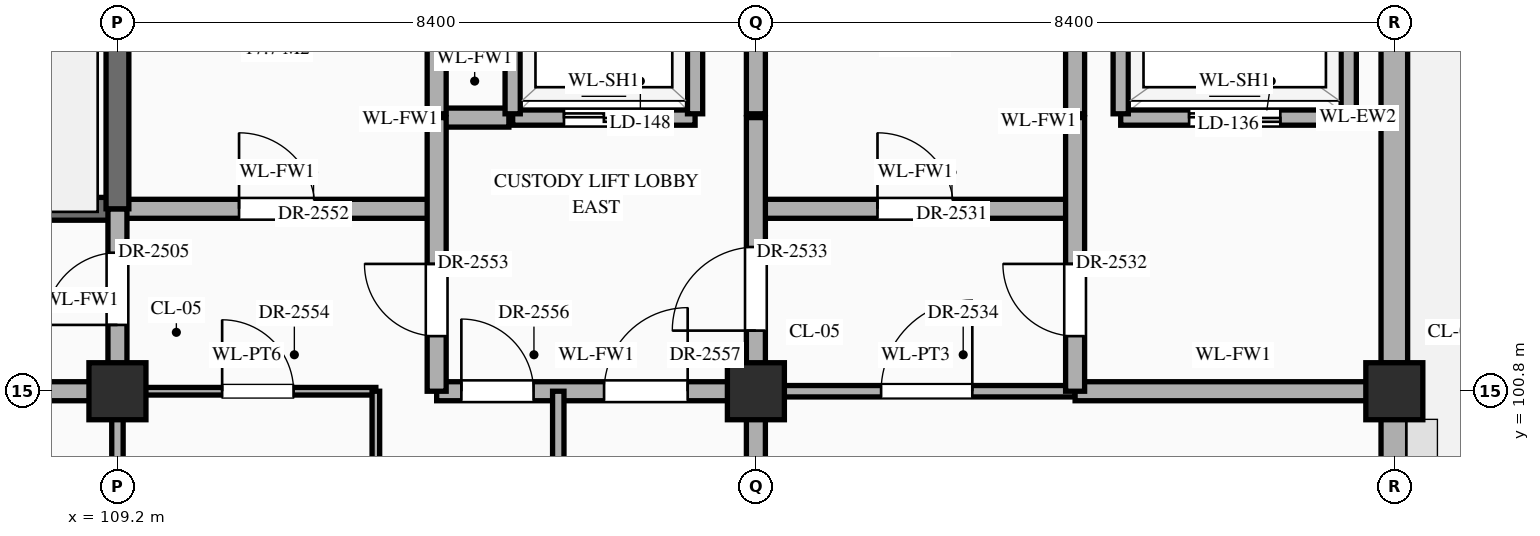
"""IFC4 building model, lengths in metres.
Left out: names, types, materials, properties, quantities, classifications, styles, units other than length and angle.
Written with IfcOpenShell. Run it as: python <this file> out.ifc"""

import sys

from ifc_helpers import new_model, si_unit, direction, frame, frame_2d, origin, origin_2d, place, context, subcontext, project, spatial, rectangle, extrude, element, fill, save


model = new_model("IFC4")
c1 = context("Model", 3, precision=1e-05, world=origin(), true_north=direction((0.0, 1.0)))
c2 = subcontext(c1, "Body", "Model", "MODEL_VIEW")
j1 = project(units=[si_unit("LENGTHUNIT", "METRE"), si_unit("PLANEANGLEUNIT", "RADIAN")], contexts=[c1])
p1 = place(None, origin())
s1 = spatial("IfcSite", under=j1, at=p1, CompositionType="ELEMENT")
p2 = place(p1, origin())
s2 = spatial("IfcBuilding", under=s1, at=p2, CompositionType="ELEMENT")
p3 = place(p2, frame((0.0, 0.0, 35.1)))
s3 = spatial("IfcBuildingStorey", under=s2, at=p3, CompositionType="ELEMENT", Elevation=35.1)
for number, where, z_axis, x_axis in (
    (1, (109.2, 100.8, 0.0), (0.0, 0.0, 1.0), (1.0, 0.0, 0.0)),
    (2, (117.6, 100.8, 0.0), (0.0, 0.0, 1.0), (1.0, 0.0, 0.0)),
    (3, (126.0, 100.8, 0.0), (0.0, 0.0, 1.0), (1.0, 0.0, 0.0)),
):
    element("IfcColumn", number, at=place(p3, frame(where, z_axis=z_axis, x_axis=x_axis)), inside=s3, PredefinedType="COLUMN", context=c2, shape_type="SweptSolid", body=[
        extrude(rectangle(XDim=0.75, YDim=0.75, at=origin_2d()), origin(), (0.0, 0.0, 1.0), 4.2),
    ])
p4 = place(p3, frame((126.0, 93.97, 0.0), z_axis=(0.0, 0.0, 1.0), x_axis=(0.0, 1.0, 0.0)))
e4 = element("IfcWall", 4, at=p4, inside=s3, PredefinedType="STANDARD", context=c2, shape_type="SweptSolid", body=[
    extrude(rectangle(XDim=6.46, YDim=0.35, at=frame_2d((3.23, 0.0))), origin(), (0.0, 0.0, 1.0), 3.3),
])
p5 = place(p4, frame((4.005, 0.0, 0.85)))
e5 = element("IfcOpeningElement", 5, at=p5, cuts=e4, PredefinedType="OPENING", context=c2, shape_type="SweptSolid", body=[
    extrude(rectangle(XDim=1.05, YDim=1.56, at=frame_2d((0.525, 0.78))), frame((0.0, 0.187, 0.0), z_axis=(0.0, -1.0, 0.0), x_axis=(1.0, 0.0, 0.0)), (0.0, 0.0, 1.0), 0.374),
])
p6 = place(p3, frame((126.0, 101.17, 0.0), z_axis=(0.0, 0.0, 1.0), x_axis=(0.0, 1.0, 0.0)))
e6 = element("IfcWall", 6, at=p6, inside=s3, PredefinedType="STANDARD", context=c2, shape_type="SweptSolid", body=[
    extrude(rectangle(XDim=6.46, YDim=0.35, at=frame_2d((3.23, 0.0))), origin(), (0.0, 0.0, 1.0), 3.3),
])
p7 = place(p3, frame((96.6, 100.8, 0.0), z_axis=(0.0, 0.0, 1.0), x_axis=(1.0, 0.0, 0.0)))
e7 = element("IfcWall", 7, at=p7, inside=s3, PredefinedType="STANDARD", context=c2, shape_type="SweptSolid", body=[
    extrude(rectangle(XDim=12.6, YDim=0.25, at=frame_2d((6.3, 0.0))), origin(), (0.0, 0.0, 1.0), 3.1),
])
p8 = place(p7, frame((7.85, 0.0, 0.0)))
e8 = element("IfcOpeningElement", 8, at=p8, cuts=e7, PredefinedType="OPENING", context=c2, shape_type="SweptSolid", body=[
    extrude(rectangle(XDim=1.1, YDim=2.2, at=frame_2d((0.55, 1.1))), frame((0.0, 0.137, 0.0), z_axis=(0.0, -1.0, 0.0), x_axis=(1.0, 0.0, 0.0)), (0.0, 0.0, 1.0), 0.274),
])
p9 = place(p3, frame((109.2, 100.8, 0.0), z_axis=(0.0, 0.0, 1.0), x_axis=(1.0, 0.0, 0.0)))
e9 = element("IfcWall", 9, at=p9, inside=s3, PredefinedType="STANDARD", context=c2, shape_type="SweptSolid", body=[
    extrude(rectangle(XDim=3.4, YDim=0.1, at=frame_2d((1.7, 0.0))), origin(), (0.0, 0.0, 1.0), 3.1),
])
p10 = place(p9, frame((1.377, 0.0, 0.0)))
e10 = element("IfcOpeningElement", 10, at=p10, cuts=e9, PredefinedType="OPENING", context=c2, shape_type="SweptSolid", body=[
    extrude(rectangle(XDim=0.94, YDim=2.3, at=frame_2d((0.47, 1.15))), frame((0.0, 0.062, 0.0), z_axis=(0.0, -1.0, 0.0), x_axis=(1.0, 0.0, 0.0)), (0.0, 0.0, 1.0), 0.124),
])
p11 = place(p3, frame((113.4, 100.8, 0.0), z_axis=(0.0, 0.0, 1.0), x_axis=(1.0, 0.0, 0.0)))
e11 = element("IfcWall", 11, at=p11, inside=s3, PredefinedType="STANDARD", context=c2, shape_type="SweptSolid", body=[
    extrude(rectangle(XDim=4.2, YDim=0.25, at=frame_2d((2.1, 0.0))), origin(), (0.0, 0.0, 1.0), 3.1),
])
p12 = place(p11, frame((0.325, 0.0, 0.0)))
e12 = element("IfcOpeningElement", 12, at=p12, cuts=e11, PredefinedType="OPENING", context=c2, shape_type="SweptSolid", body=[
    extrude(rectangle(XDim=0.95, YDim=2.15, at=frame_2d((0.475, 1.075))), frame((0.0, 0.137, 0.0), z_axis=(0.0, -1.0, 0.0), x_axis=(1.0, 0.0, 0.0)), (0.0, 0.0, 1.0), 0.274),
])
p13 = place(p11, frame((2.202, 0.0, 0.0)))
e13 = element("IfcOpeningElement", 13, at=p13, cuts=e11, PredefinedType="OPENING", context=c2, shape_type="SweptSolid", body=[
    extrude(rectangle(XDim=1.1, YDim=2.2, at=frame_2d((0.55, 1.1))), frame((0.0, 0.137, 0.0), z_axis=(0.0, -1.0, 0.0), x_axis=(1.0, 0.0, 0.0)), (0.0, 0.0, 1.0), 0.274),
])
p14 = place(p3, frame((117.6, 100.8, 0.0), z_axis=(0.0, 0.0, 1.0), x_axis=(1.0, 0.0, 0.0)))
e14 = element("IfcWall", 14, at=p14, inside=s3, PredefinedType="STANDARD", context=c2, shape_type="SweptSolid", body=[
    extrude(rectangle(XDim=4.2, YDim=0.15, at=frame_2d((2.1, 0.0))), origin(), (0.0, 0.0, 1.0), 3.1),
])
p15 = place(p14, frame((1.647, 0.0, 0.0)))
e15 = element("IfcOpeningElement", 15, at=p15, cuts=e14, PredefinedType="OPENING", context=c2, shape_type="SweptSolid", body=[
    extrude(rectangle(XDim=1.2, YDim=2.35, at=frame_2d((0.6, 1.175))), frame((0.0, 0.087, 0.0), z_axis=(0.0, -1.0, 0.0), x_axis=(1.0, 0.0, 0.0)), (0.0, 0.0, 1.0), 0.174),
])
p16 = place(p3, frame((121.8, 100.8, 0.0), z_axis=(0.0, 0.0, 1.0), x_axis=(1.0, 0.0, 0.0)))
e16 = element("IfcWall", 16, at=p16, inside=s3, PredefinedType="STANDARD", context=c2, shape_type="SweptSolid", body=[
    extrude(rectangle(XDim=4.16, YDim=0.25, at=frame_2d((2.08, 0.0))), origin(), (0.0, 0.0, 1.0), 3.1),
])
p17 = place(p3, frame((100.8, 103.2, 0.0), z_axis=(0.0, 0.0, 1.0), x_axis=(1.0, 0.0, 0.0)))
e17 = element("IfcWall", 17, at=p17, inside=s3, PredefinedType="SHEAR", context=c2, shape_type="SweptSolid", body=[
    extrude(rectangle(XDim=8.4, YDim=0.3, at=frame_2d((4.2, 0.0))), origin(), (0.0, 0.0, 1.0), 3.95),
])
p18 = place(p17, frame((0.65, 0.0, 0.0)))
e18 = element("IfcOpeningElement", 18, at=p18, cuts=e17, PredefinedType="OPENING", context=c2, shape_type="SweptSolid", body=[
    extrude(rectangle(XDim=1.1, YDim=2.2, at=frame_2d((0.55, 1.1))), frame((0.0, 0.162, 0.0), z_axis=(0.0, -1.0, 0.0), x_axis=(1.0, 0.0, 0.0)), (0.0, 0.0, 1.0), 0.324),
])
p19 = place(p3, frame((109.2, 103.2, 0.0), z_axis=(0.0, 0.0, 1.0), x_axis=(1.0, 0.0, 0.0)))
e19 = element("IfcWall", 19, at=p19, inside=s3, PredefinedType="STANDARD", context=c2, shape_type="SweptSolid", body=[
    extrude(rectangle(XDim=4.2, YDim=0.25, at=frame_2d((2.1, 0.0))), origin(), (0.0, 0.0, 1.0), 3.95),
])
p20 = place(p19, frame((1.6, 0.0, 0.0)))
e20 = element("IfcOpeningElement", 20, at=p20, cuts=e19, PredefinedType="OPENING", context=c2, shape_type="SweptSolid", body=[
    extrude(rectangle(XDim=1.0, YDim=2.2, at=frame_2d((0.5, 1.1))), frame((0.0, 0.137, 0.0), z_axis=(0.0, -1.0, 0.0), x_axis=(1.0, 0.0, 0.0)), (0.0, 0.0, 1.0), 0.274),
])
p21 = place(p3, frame((117.6, 103.2, 0.0), z_axis=(0.0, 0.0, 1.0), x_axis=(1.0, 0.0, 0.0)))
e21 = element("IfcWall", 21, at=p21, inside=s3, PredefinedType="STANDARD", context=c2, shape_type="SweptSolid", body=[
    extrude(rectangle(XDim=4.2, YDim=0.25, at=frame_2d((2.1, 0.0))), origin(), (0.0, 0.0, 1.0), 3.95),
])
p22 = place(p21, frame((1.6, 0.0, 0.0)))
e22 = element("IfcOpeningElement", 22, at=p22, cuts=e21, PredefinedType="OPENING", context=c2, shape_type="SweptSolid", body=[
    extrude(rectangle(XDim=1.0, YDim=2.2, at=frame_2d((0.5, 1.1))), frame((0.0, 0.137, 0.0), z_axis=(0.0, -1.0, 0.0), x_axis=(1.0, 0.0, 0.0)), (0.0, 0.0, 1.0), 0.274),
])
p23 = place(p3, frame((113.45, 104.4, 0.0), z_axis=(0.0, 0.0, 1.0), x_axis=(1.0, 0.0, 0.0)))
e23 = element("IfcWall", 23, at=p23, inside=s3, PredefinedType="STANDARD", context=c2, shape_type="SweptSolid", body=[
    extrude(rectangle(XDim=0.9, YDim=0.25, at=frame_2d((0.45, 0.0))), origin(), (0.0, 0.0, 1.0), 3.95),
])
p24 = place(p3, frame((114.4, 104.4, 0.0), z_axis=(0.0, 0.0, 1.0), x_axis=(1.0, 0.0, 0.0)))
e24 = element("IfcWall", 24, at=p24, inside=s3, PredefinedType="STANDARD", context=c2, shape_type="SweptSolid", body=[
    extrude(rectangle(XDim=2.4, YDim=0.2, at=frame_2d((1.2, 0.0))), origin(), (0.0, 0.0, 1.0), 3.95),
])
p25 = place(p24, frame((0.675, 0.0, 0.0)))
e25 = element("IfcOpeningElement", 25, at=p25, cuts=e24, PredefinedType="OPENING", context=c2, shape_type="SweptSolid", body=[
    extrude(rectangle(XDim=1.05, YDim=2.15, at=frame_2d((0.525, 1.075))), frame((0.0, 0.112, 0.0), z_axis=(0.0, -1.0, 0.0), x_axis=(1.0, 0.0, 0.0)), (0.0, 0.0, 1.0), 0.224),
])
p26 = place(p3, frame((122.4, 104.4, 0.0), z_axis=(0.0, 0.0, 1.0), x_axis=(1.0, 0.0, 0.0)))
e26 = element("IfcWall", 26, at=p26, inside=s3, PredefinedType="STANDARD", context=c2, shape_type="SweptSolid", body=[
    extrude(rectangle(XDim=3.0, YDim=0.2, at=frame_2d((1.5, 0.0))), origin(), (0.0, 0.0, 1.0), 3.95),
])
p27 = place(p26, frame((0.9, 0.0, 0.0)))
e27 = element("IfcOpeningElement", 27, at=p27, cuts=e26, PredefinedType="OPENING", context=c2, shape_type="SweptSolid", body=[
    extrude(rectangle(XDim=1.2, YDim=2.15, at=frame_2d((0.6, 1.075))), frame((0.0, 0.112, 0.0), z_axis=(0.0, -1.0, 0.0), x_axis=(1.0, 0.0, 0.0)), (0.0, 0.0, 1.0), 0.224),
])
p28 = place(p3, frame((109.2, 96.0, 0.0), z_axis=(0.0, 0.0, 1.0), x_axis=(0.0, 1.0, 0.0)))
e28 = element("IfcWall", 28, at=p28, inside=s3, PredefinedType="STANDARD", context=c2, shape_type="SweptSolid", body=[
    extrude(rectangle(XDim=4.8, YDim=0.15, at=frame_2d((2.4, 0.0))), origin(), (0.0, 0.0, 1.0), 3.2),
])
p29 = place(p3, frame((109.2, 100.8, 0.0), z_axis=(0.0, 0.0, 1.0), x_axis=(0.0, 1.0, 0.0)))
e29 = element("IfcWall", 29, at=p29, inside=s3, PredefinedType="STANDARD", context=c2, shape_type="SweptSolid", body=[
    extrude(rectangle(XDim=2.4, YDim=0.25, at=frame_2d((1.2, 0.0))), origin(), (0.0, 0.0, 1.0), 3.2),
])
p30 = place(p29, frame((0.873, 0.0, 0.0)))
e30 = element("IfcOpeningElement", 30, at=p30, cuts=e29, PredefinedType="OPENING", context=c2, shape_type="SweptSolid", body=[
    extrude(rectangle(XDim=0.95, YDim=2.15, at=frame_2d((0.475, 1.075))), frame((0.0, 0.137, 0.0), z_axis=(0.0, -1.0, 0.0), x_axis=(1.0, 0.0, 0.0)), (0.0, 0.0, 1.0), 0.274),
])
p31 = place(p3, frame((109.2, 103.2, 0.0), z_axis=(0.0, 0.0, 1.0), x_axis=(0.0, 1.0, 0.0)))
e31 = element("IfcWall", 31, at=p31, inside=s3, PredefinedType="SHEAR", context=c2, shape_type="SweptSolid", body=[
    extrude(rectangle(XDim=4.8, YDim=0.3, at=frame_2d((2.4, 0.0))), origin(), (0.0, 0.0, 1.0), 3.95),
])
p32 = place(p3, frame((112.6, 96.0, 0.0), z_axis=(0.0, 0.0, 1.0), x_axis=(0.0, 1.0, 0.0)))
e32 = element("IfcWall", 32, at=p32, inside=s3, PredefinedType="STANDARD", context=c2, shape_type="SweptSolid", body=[
    extrude(rectangle(XDim=4.8, YDim=0.1, at=frame_2d((2.4, 0.0))), origin(), (0.0, 0.0, 1.0), 3.95),
])
p33 = place(p32, frame((1.94, 0.0, 0.0)))
e33 = element("IfcOpeningElement", 33, at=p33, cuts=e32, PredefinedType="OPENING", context=c2, shape_type="SweptSolid", body=[
    extrude(rectangle(XDim=0.92, YDim=2.15, at=frame_2d((0.46, 1.075))), frame((0.0, 0.062, 0.0), z_axis=(0.0, -1.0, 0.0), x_axis=(1.0, 0.0, 0.0)), (0.0, 0.0, 1.0), 0.124),
])
p34 = place(p3, frame((113.4, 100.8, 0.0), z_axis=(0.0, 0.0, 1.0), x_axis=(0.0, 1.0, 0.0)))
e34 = element("IfcWall", 34, at=p34, inside=s3, PredefinedType="STANDARD", context=c2, shape_type="SweptSolid", body=[
    extrude(rectangle(XDim=3.6, YDim=0.25, at=frame_2d((1.8, 0.0))), origin(), (0.0, 0.0, 1.0), 3.95),
])
p35 = place(p34, frame((0.725, 0.0, 0.0)))
e35 = element("IfcOpeningElement", 35, at=p35, cuts=e34, PredefinedType="OPENING", context=c2, shape_type="SweptSolid", body=[
    extrude(rectangle(XDim=0.95, YDim=2.15, at=frame_2d((0.475, 1.075))), frame((0.0, 0.137, 0.0), z_axis=(0.0, -1.0, 0.0), x_axis=(1.0, 0.0, 0.0)), (0.0, 0.0, 1.0), 0.274),
])
p36 = place(p3, frame((113.4, 104.45, 0.0), z_axis=(0.0, 0.0, 1.0), x_axis=(0.0, 1.0, 0.0)))
e36 = element("IfcWall", 36, at=p36, inside=s3, PredefinedType="STANDARD", context=c2, shape_type="SweptSolid", body=[
    extrude(rectangle(XDim=3.5, YDim=0.25, at=frame_2d((1.75, 0.0))), origin(), (0.0, 0.0, 1.0), 3.95),
])
p37 = place(p3, frame((114.4, 104.45, 0.0), z_axis=(0.0, 0.0, 1.0), x_axis=(0.0, 1.0, 0.0)))
e37 = element("IfcWall", 37, at=p37, inside=s3, PredefinedType="STANDARD", context=c2, shape_type="SweptSolid", body=[
    extrude(rectangle(XDim=2.3, YDim=0.2, at=frame_2d((1.15, 0.0))), origin(), (0.0, 0.0, 1.0), 3.95),
])
p38 = place(p3, frame((115.0, 96.0, 0.0), z_axis=(0.0, 0.0, 1.0), x_axis=(0.0, 1.0, 0.0)))
e38 = element("IfcWall", 38, at=p38, inside=s3, PredefinedType="STANDARD", context=c2, shape_type="SweptSolid", body=[
    extrude(rectangle(XDim=4.8, YDim=0.15, at=frame_2d((2.4, 0.0))), origin(), (0.0, 0.0, 1.0), 3.95),
])
p39 = place(p38, frame((1.92, 0.0, 0.0)))
e39 = element("IfcOpeningElement", 39, at=p39, cuts=e38, PredefinedType="OPENING", context=c2, shape_type="SweptSolid", body=[
    extrude(rectangle(XDim=0.96, YDim=2.2, at=frame_2d((0.48, 1.1))), frame((0.0, 0.087, 0.0), z_axis=(0.0, -1.0, 0.0), x_axis=(1.0, 0.0, 0.0)), (0.0, 0.0, 1.0), 0.174),
])
p40 = place(p3, frame((116.8, 104.45, 0.0), z_axis=(0.0, 0.0, 1.0), x_axis=(0.0, 1.0, 0.0)))
e40 = element("IfcWall", 40, at=p40, inside=s3, PredefinedType="STANDARD", context=c2, shape_type="SweptSolid", body=[
    extrude(rectangle(XDim=2.3, YDim=0.2, at=frame_2d((1.15, 0.0))), origin(), (0.0, 0.0, 1.0), 3.95),
])
p41 = place(p3, frame((117.6, 91.2, 0.0), z_axis=(0.0, 0.0, 1.0), x_axis=(0.0, 1.0, 0.0)))
e41 = element("IfcWall", 41, at=p41, inside=s3, PredefinedType="STANDARD", context=c2, shape_type="SweptSolid", body=[
    extrude(rectangle(XDim=13.2, YDim=0.25, at=frame_2d((6.6, 0.0))), origin(), (0.0, 0.0, 1.0), 3.2),
])
p42 = place(p41, frame((0.552, 0.0, 0.0)))
e42 = element("IfcOpeningElement", 42, at=p42, cuts=e41, PredefinedType="OPENING", context=c2, shape_type="SweptSolid", body=[
    extrude(rectangle(XDim=1.0, YDim=2.2, at=frame_2d((0.5, 1.1))), frame((0.0, 0.137, 0.0), z_axis=(0.0, -1.0, 0.0), x_axis=(1.0, 0.0, 0.0)), (0.0, 0.0, 1.0), 0.274),
])
p43 = place(p41, frame((10.397, 0.0, 0.0)))
e43 = element("IfcOpeningElement", 43, at=p43, cuts=e41, PredefinedType="OPENING", context=c2, shape_type="SweptSolid", body=[
    extrude(rectangle(XDim=1.1, YDim=2.2, at=frame_2d((0.55, 1.1))), frame((0.0, 0.137, 0.0), z_axis=(0.0, -1.0, 0.0), x_axis=(1.0, 0.0, 0.0)), (0.0, 0.0, 1.0), 0.274),
])
p44 = place(p41, frame((3.198, 0.0, 0.0)))
e44 = element("IfcOpeningElement", 44, at=p44, cuts=e41, PredefinedType="OPENING", context=c2, shape_type="SweptSolid", body=[
    extrude(rectangle(XDim=1.1, YDim=2.2, at=frame_2d((0.55, 1.1))), frame((0.0, 0.137, 0.0), z_axis=(0.0, -1.0, 0.0), x_axis=(1.0, 0.0, 0.0)), (0.0, 0.0, 1.0), 0.274),
])
p45 = place(p3, frame((117.6, 104.45, 0.0), z_axis=(0.0, 0.0, 1.0), x_axis=(0.0, 1.0, 0.0)))
e45 = element("IfcWall", 45, at=p45, inside=s3, PredefinedType="STANDARD", context=c2, shape_type="SweptSolid", body=[
    extrude(rectangle(XDim=3.46, YDim=0.25, at=frame_2d((1.73, 0.0))), origin(), (0.0, 0.0, 1.0), 3.2),
])
p46 = place(p3, frame((121.8, 100.8, 0.0), z_axis=(0.0, 0.0, 1.0), x_axis=(0.0, 1.0, 0.0)))
e46 = element("IfcWall", 46, at=p46, inside=s3, PredefinedType="STANDARD", context=c2, shape_type="SweptSolid", body=[
    extrude(rectangle(XDim=3.6, YDim=0.25, at=frame_2d((1.8, 0.0))), origin(), (0.0, 0.0, 1.0), 3.6),
])
p47 = place(p46, frame((0.725, 0.0, 0.0)))
e47 = element("IfcOpeningElement", 47, at=p47, cuts=e46, PredefinedType="OPENING", context=c2, shape_type="SweptSolid", body=[
    extrude(rectangle(XDim=0.95, YDim=2.15, at=frame_2d((0.475, 1.075))), frame((0.0, 0.137, 0.0), z_axis=(0.0, -1.0, 0.0), x_axis=(1.0, 0.0, 0.0)), (0.0, 0.0, 1.0), 0.274),
])
p48 = place(p3, frame((121.8, 104.45, 0.0), z_axis=(0.0, 0.0, 1.0), x_axis=(0.0, 1.0, 0.0)))
e48 = element("IfcWall", 48, at=p48, inside=s3, PredefinedType="STANDARD", context=c2, shape_type="SweptSolid", body=[
    extrude(rectangle(XDim=3.46, YDim=0.25, at=frame_2d((1.73, 0.0))), origin(), (0.0, 0.0, 1.0), 3.6),
])
for number, where, z_axis, x_axis in (
    (49, (122.4, 104.45, 0.0), (0.0, 0.0, 1.0), (0.0, 1.0, 0.0)),
    (50, (125.4, 104.45, 0.0), (0.0, 0.0, 1.0), (0.0, 1.0, 0.0)),
):
    element("IfcWall", number, at=place(p3, frame(where, z_axis=z_axis, x_axis=x_axis)), inside=s3, PredefinedType="STANDARD", context=c2, shape_type="SweptSolid", body=[
        extrude(rectangle(XDim=2.3, YDim=0.2, at=frame_2d((1.15, 0.0))), origin(), (0.0, 0.0, 1.0), 3.95),
    ])
p49 = place(p27, origin())
e51 = element("IfcDoor", 51, at=p49, inside=s3, OperationType="DOUBLE_DOOR_SLIDING", PredefinedType="DOOR", context=c2, shape_type="SweptSolid", body=[
    extrude(rectangle(XDim=1.2, YDim=2.15, at=frame_2d((0.6, 1.075))), frame((0.0, 0.025, 0.0), z_axis=(0.0, -1.0, 0.0), x_axis=(1.0, 0.0, 0.0)), (0.0, 0.0, 1.0), 0.05),
])
fill(e27, e51)
p50 = place(p25, origin())
e52 = element("IfcDoor", 52, at=p50, inside=s3, OperationType="DOUBLE_DOOR_SLIDING", PredefinedType="DOOR", context=c2, shape_type="SweptSolid", body=[
    extrude(rectangle(XDim=1.05, YDim=2.15, at=frame_2d((0.525, 1.075))), frame((0.0, 0.025, 0.0), z_axis=(0.0, -1.0, 0.0), x_axis=(1.0, 0.0, 0.0)), (0.0, 0.0, 1.0), 0.05),
])
fill(e25, e52)
p51 = place(p30, origin())
e53 = element("IfcDoor", 53, at=p51, inside=s3, OperationType="SINGLE_SWING_LEFT", PredefinedType="DOOR", context=c2, shape_type="SweptSolid", body=[
    extrude(rectangle(XDim=0.95, YDim=2.15, at=frame_2d((0.475, 1.075))), frame((0.0, 0.025, 0.0), z_axis=(0.0, -1.0, 0.0), x_axis=(1.0, 0.0, 0.0)), (0.0, 0.0, 1.0), 0.05),
])
fill(e30, e53)
p52 = place(p22, origin())
e54 = element("IfcDoor", 54, at=p52, inside=s3, OperationType="SINGLE_SWING_LEFT", PredefinedType="DOOR", context=c2, shape_type="SweptSolid", body=[
    extrude(rectangle(XDim=1.0, YDim=2.2, at=frame_2d((0.5, 1.1))), frame((0.0, 0.025, 0.0), z_axis=(0.0, -1.0, 0.0), x_axis=(1.0, 0.0, 0.0)), (0.0, 0.0, 1.0), 0.05),
])
fill(e22, e54)
p53 = place(p47, origin())
e55 = element("IfcDoor", 55, at=p53, inside=s3, OperationType="SINGLE_SWING_RIGHT", PredefinedType="DOOR", context=c2, shape_type="SweptSolid", body=[
    extrude(rectangle(XDim=0.95, YDim=2.15, at=frame_2d((0.475, 1.075))), frame((0.0, 0.025, 0.0), z_axis=(0.0, -1.0, 0.0), x_axis=(1.0, 0.0, 0.0)), (0.0, 0.0, 1.0), 0.05),
])
fill(e47, e55)
p54 = place(p43, origin())
e56 = element("IfcDoor", 56, at=p54, inside=s3, OperationType="SINGLE_SWING_LEFT", PredefinedType="DOOR", context=c2, shape_type="SweptSolid", body=[
    extrude(rectangle(XDim=1.1, YDim=2.2, at=frame_2d((0.55, 1.1))), frame((0.0, 0.025, 0.0), z_axis=(0.0, -1.0, 0.0), x_axis=(1.0, 0.0, 0.0)), (0.0, 0.0, 1.0), 0.05),
])
fill(e43, e56)
p55 = place(p15, origin())
e57 = element("IfcDoor", 57, at=p55, inside=s3, OperationType="SINGLE_SWING_RIGHT", PredefinedType="DOOR", context=c2, shape_type="SweptSolid", body=[
    extrude(rectangle(XDim=1.2, YDim=2.35, at=frame_2d((0.6, 1.175))), frame((0.0, 0.025, 0.0), z_axis=(0.0, -1.0, 0.0), x_axis=(1.0, 0.0, 0.0)), (0.0, 0.0, 1.0), 0.05),
])
fill(e15, e57)
p56 = place(p20, origin())
e58 = element("IfcDoor", 58, at=p56, inside=s3, OperationType="SINGLE_SWING_LEFT", PredefinedType="DOOR", context=c2, shape_type="SweptSolid", body=[
    extrude(rectangle(XDim=1.0, YDim=2.2, at=frame_2d((0.5, 1.1))), frame((0.0, 0.025, 0.0), z_axis=(0.0, -1.0, 0.0), x_axis=(1.0, 0.0, 0.0)), (0.0, 0.0, 1.0), 0.05),
])
fill(e20, e58)
p57 = place(p35, origin())
e59 = element("IfcDoor", 59, at=p57, inside=s3, OperationType="SINGLE_SWING_RIGHT", PredefinedType="DOOR", context=c2, shape_type="SweptSolid", body=[
    extrude(rectangle(XDim=0.95, YDim=2.15, at=frame_2d((0.475, 1.075))), frame((0.0, 0.025, 0.0), z_axis=(0.0, -1.0, 0.0), x_axis=(1.0, 0.0, 0.0)), (0.0, 0.0, 1.0), 0.05),
])
fill(e35, e59)
p58 = place(p10, origin())
e60 = element("IfcDoor", 60, at=p58, inside=s3, OperationType="SINGLE_SWING_LEFT", PredefinedType="DOOR", context=c2, shape_type="SweptSolid", body=[
    extrude(rectangle(XDim=0.94, YDim=2.3, at=frame_2d((0.47, 1.15))), frame((0.0, 0.025, 0.0), z_axis=(0.0, -1.0, 0.0), x_axis=(1.0, 0.0, 0.0)), (0.0, 0.0, 1.0), 0.05),
])
fill(e10, e60)
p59 = place(p12, origin())
e61 = element("IfcDoor", 61, at=p59, inside=s3, OperationType="SINGLE_SWING_LEFT", PredefinedType="DOOR", context=c2, shape_type="SweptSolid", body=[
    extrude(rectangle(XDim=0.95, YDim=2.15, at=frame_2d((0.475, 1.075))), frame((0.0, 0.025, 0.0), z_axis=(0.0, -1.0, 0.0), x_axis=(1.0, 0.0, 0.0)), (0.0, 0.0, 1.0), 0.05),
])
fill(e12, e61)
p60 = place(p13, origin())
e62 = element("IfcDoor", 62, at=p60, inside=s3, OperationType="SINGLE_SWING_RIGHT", PredefinedType="DOOR", context=c2, shape_type="SweptSolid", body=[
    extrude(rectangle(XDim=1.1, YDim=2.2, at=frame_2d((0.55, 1.1))), frame((0.0, 0.025, 0.0), z_axis=(0.0, -1.0, 0.0), x_axis=(1.0, 0.0, 0.0)), (0.0, 0.0, 1.0), 0.05),
])
fill(e13, e62)
save(model, sys.argv[1])
